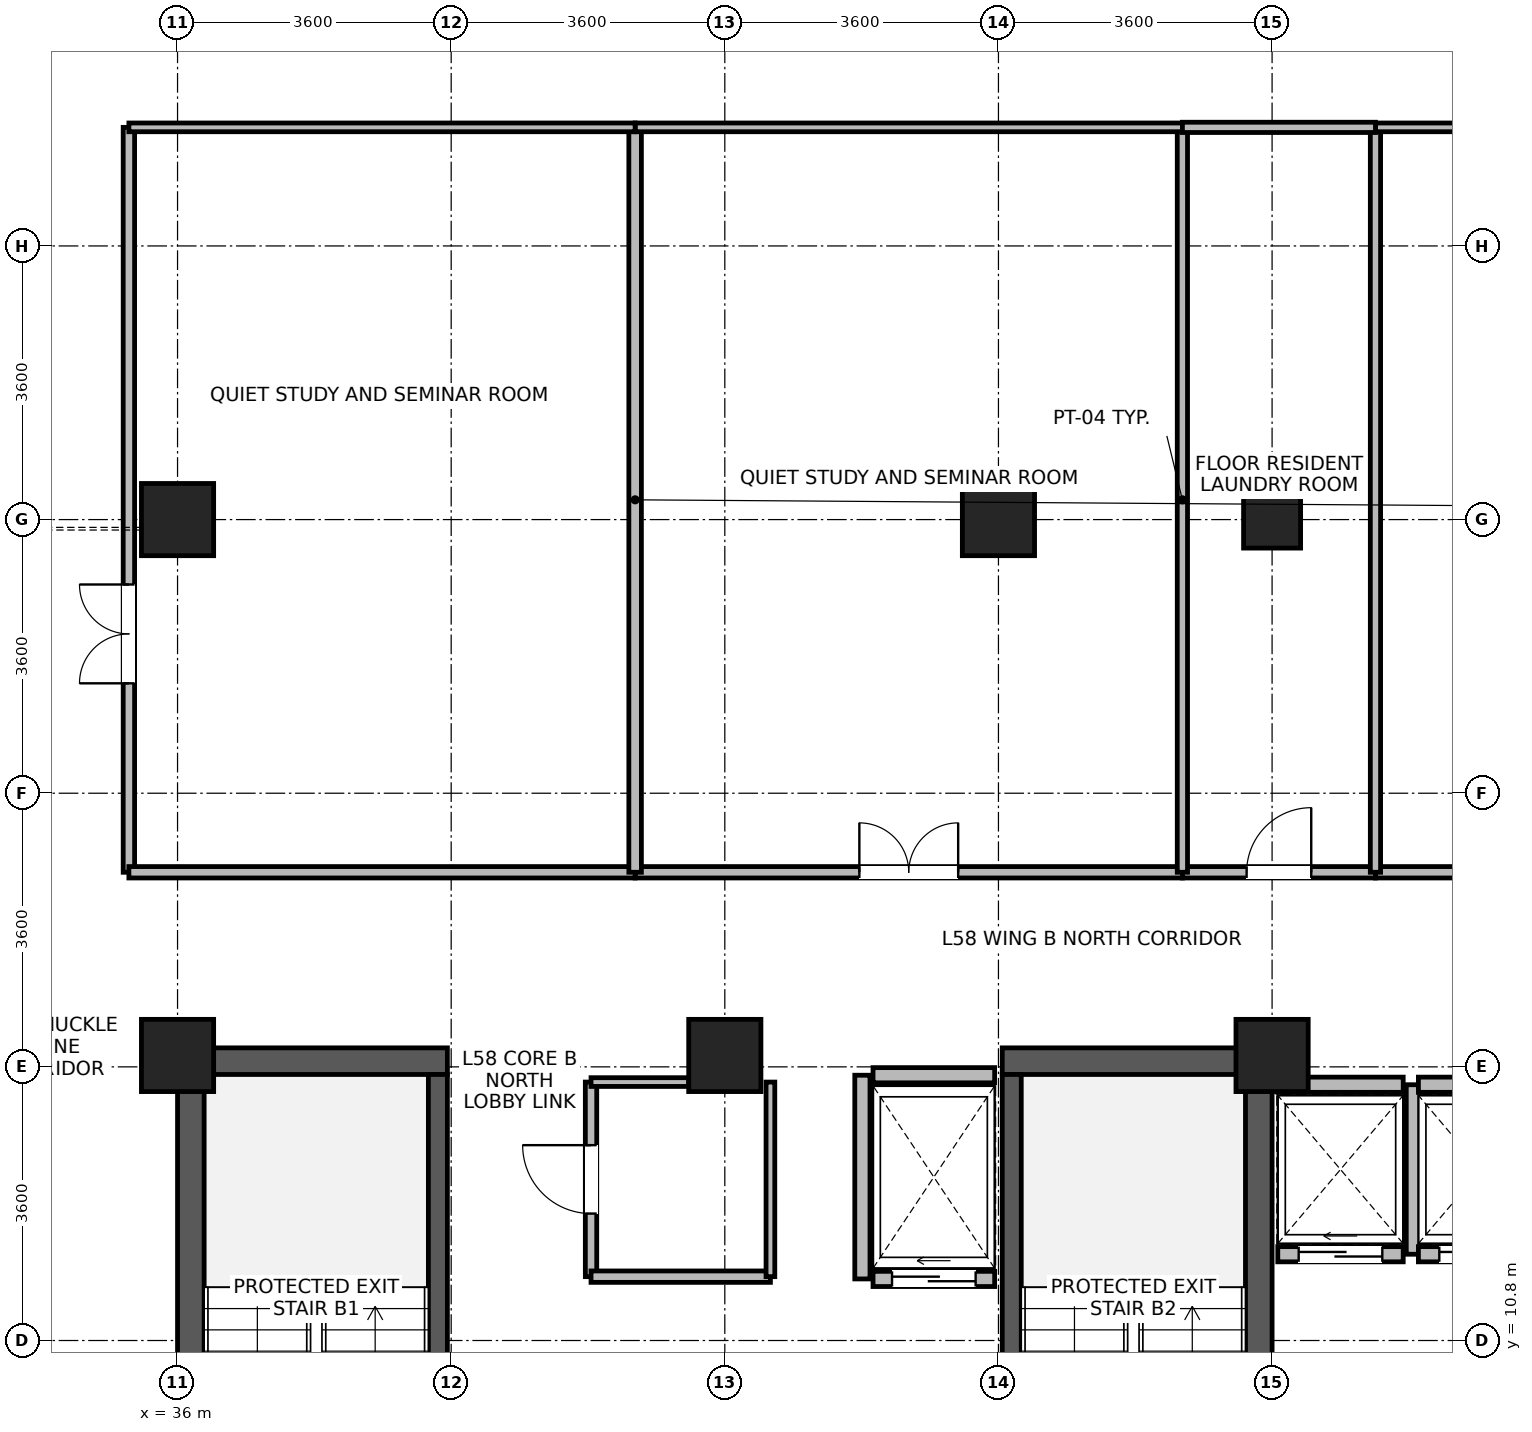
"""IFC4 building model, lengths in metres.
Left out: names, types, materials, properties, quantities, classifications, styles, units other than length and angle.
Written with IfcOpenShell. Run it as: python <this file> out.ifc"""

import sys

from ifc_helpers import new_model, si_unit, direction, frame, frame_2d, origin, origin_2d, place, context, subcontext, project, spatial, rectangle, extrude, source, transform, mapped, element, fill, save


model = new_model("IFC4")
c1 = context("Model", 3, precision=1e-05, world=origin(), true_north=direction((0.0, 1.0)))
c2 = subcontext(c1, "Body", "Model", "MODEL_VIEW")
j1 = project(units=[si_unit("LENGTHUNIT", "METRE"), si_unit("PLANEANGLEUNIT", "RADIAN")], contexts=[c1])
p1 = place(None, origin())
s1 = spatial("IfcSite", under=j1, at=p1, CompositionType="ELEMENT")
p2 = place(p1, origin())
s2 = spatial("IfcBuilding", under=s1, at=p2, CompositionType="ELEMENT")
p3 = place(p2, frame((0.0, 0.0, 227.7)))
s3 = spatial("IfcBuildingStorey", under=s2, at=p3, CompositionType="ELEMENT", Elevation=227.7)
for number, where, z_axis, x_axis in (
    (1, (36.175, 6.95, 0.0), (0.0, 0.0, 1.0), (0.0, 1.0, 0.0)),
    (2, (50.225, 6.95, 0.0), (0.0, 0.0, 1.0), (0.0, 1.0, 0.0)),
):
    element("IfcWall", number, at=place(p3, frame(where, z_axis=z_axis, x_axis=x_axis)), inside=s3, PredefinedType="SHEAR", context=c2, shape_type="SweptSolid", body=[
        extrude(rectangle(XDim=7.7, YDim=0.35, at=frame_2d((3.85, 0.0))), origin(), (0.0, 0.0, 1.0), 3.47),
    ])
for number, where, z_axis, x_axis in (
    (3, (36.35, 14.475, 0.0), (0.0, 0.0, 1.0), (1.0, 0.0, 0.0)),
    (4, (46.85, 14.475, 0.0), (0.0, 0.0, 1.0), (1.0, 0.0, 0.0)),
):
    element("IfcWall", number, at=place(p3, frame(where, z_axis=z_axis, x_axis=x_axis)), inside=s3, PredefinedType="SHEAR", context=c2, shape_type="SweptSolid", body=[
        extrude(rectangle(XDim=3.2, YDim=0.35, at=frame_2d((1.6, 0.0))), origin(), (0.0, 0.0, 1.0), 3.47),
    ])
p4 = place(p3, frame((39.425, 7.3, 0.0), z_axis=(0.0, 0.0, 1.0), x_axis=(0.0, 1.0, 0.0)))
e5 = element("IfcWall", 5, at=p4, inside=s3, PredefinedType="SHEAR", context=c2, shape_type="SweptSolid", body=[
    extrude(rectangle(XDim=7.0, YDim=0.25, at=frame_2d((3.5, 0.0))), origin(), (0.0, 0.0, 1.0), 3.47),
])
p5 = place(p4, frame((0.15, 0.0, 0.0)))
e6 = element("IfcOpeningElement", 6, at=p5, cuts=e5, PredefinedType="OPENING", context=c2, shape_type="SweptSolid", body=[
    extrude(rectangle(XDim=1.1, YDim=2.08, at=frame_2d((0.55, 1.04))), frame((0.0, 0.135, 0.0), z_axis=(0.0, -1.0, 0.0), x_axis=(1.0, 0.0, 0.0)), (0.0, 0.0, 1.0), 0.27),
])
p6 = place(p3, frame((46.975, 7.3, 0.0), z_axis=(0.0, 0.0, 1.0), x_axis=(0.0, 1.0, 0.0)))
e7 = element("IfcWall", 7, at=p6, inside=s3, PredefinedType="SHEAR", context=c2, shape_type="SweptSolid", body=[
    extrude(rectangle(XDim=7.0, YDim=0.25, at=frame_2d((3.5, 0.0))), origin(), (0.0, 0.0, 1.0), 3.47),
])
p7 = place(p6, frame((0.15, 0.0, 0.0)))
e8 = element("IfcOpeningElement", 8, at=p7, cuts=e7, PredefinedType="OPENING", context=c2, shape_type="SweptSolid", body=[
    extrude(rectangle(XDim=1.1, YDim=2.08, at=frame_2d((0.55, 1.04))), frame((0.0, 0.135, 0.0), z_axis=(0.0, -1.0, 0.0), x_axis=(1.0, 0.0, 0.0)), (0.0, 0.0, 1.0), 0.27),
])
m1 = source(origin(), c2, "Body", "SweptSolid", [
    extrude(rectangle(XDim=0.95, YDim=0.95, at=origin_2d()), origin(), (0.0, 0.0, 1.0), 3.7),
])
for number, where, z_axis, x_axis in (
    (9, (36.0, 21.6, 0.0), (0.0, 0.0, 1.0), (1.0, 0.0, 0.0)),
    (10, (46.8, 21.6, 0.0), (0.0, 0.0, 1.0), (1.0, 0.0, 0.0)),
    (11, (36.0, 14.55, 0.0), (0.0, 0.0, 1.0), (1.0, 0.0, 0.0)),
    (12, (43.2, 14.55, 0.0), (0.0, 0.0, 1.0), (1.0, 0.0, 0.0)),
    (13, (50.4, 14.55, 0.0), (0.0, 0.0, 1.0), (1.0, 0.0, 0.0)),
):
    element("IfcColumn", number, at=place(p3, frame(where, z_axis=z_axis, x_axis=x_axis)), inside=s3, PredefinedType="COLUMN", context=c2, shape_type="MappedRepresentation", body=[
        mapped(m1, transform((0.0, 0.0, 0.0), x_axis=(1.0, 0.0, 0.0), y_axis=(0.0, 1.0, 0.0), z_axis=(0.0, 0.0, 1.0), scale=1.0)),
    ])
m2 = source(origin(), c2, "Body", "SweptSolid", [
    extrude(rectangle(XDim=0.75, YDim=0.75, at=origin_2d()), origin(), (0.0, 0.0, 1.0), 3.7),
])
p8 = place(p3, frame((50.4, 21.6, 0.0), z_axis=(0.0, 0.0, 1.0), x_axis=(1.0, 0.0, 0.0)))
e14 = element("IfcColumn", 14, at=p8, inside=s3, PredefinedType="PILASTER", context=c2, shape_type="MappedRepresentation", body=[
    mapped(m2, transform((0.0, 0.0, 0.0), x_axis=(1.0, 0.0, 0.0), y_axis=(0.0, 1.0, 0.0), z_axis=(0.0, 0.0, 1.0), scale=1.0)),
])
p9 = place(p3, frame((50.475, 11.935, 0.0), z_axis=(0.0, 0.0, 1.0), x_axis=(1.0, 0.0, 0.0)))
e15 = element("IfcWall", 15, at=p9, inside=s3, PredefinedType="PARTITIONING", context=c2, shape_type="SweptSolid", body=[
    extrude(rectangle(XDim=1.65, YDim=0.2, at=frame_2d((0.825, 0.0))), origin(), (0.0, 0.0, 1.0), 3.45),
])
p10 = place(p9, frame((0.275, 0.0, 0.0)))
e16 = element("IfcOpeningElement", 16, at=p10, cuts=e15, PredefinedType="OPENING", context=c2, shape_type="SweptSolid", body=[
    extrude(rectangle(XDim=1.1, YDim=2.12, at=frame_2d((0.55, 1.06))), frame((0.0, 0.11, 0.0), z_axis=(0.0, -1.0, 0.0), x_axis=(1.0, 0.0, 0.0)), (0.0, 0.0, 1.0), 0.22),
])
p11 = place(p3, frame((50.475, 14.165, 0.0), z_axis=(0.0, 0.0, 1.0), x_axis=(1.0, 0.0, 0.0)))
e17 = element("IfcWall", 17, at=p11, inside=s3, PredefinedType="PARTITIONING", context=c2, shape_type="SweptSolid", body=[
    extrude(rectangle(XDim=1.65, YDim=0.2, at=frame_2d((0.825, 0.0))), origin(), (0.0, 0.0, 1.0), 3.45),
])
p12 = place(p3, frame((52.265, 11.935, 0.0), z_axis=(0.0, 0.0, 1.0), x_axis=(0.0, 1.0, 0.0)))
e18 = element("IfcWall", 18, at=p12, inside=s3, PredefinedType="PARTITIONING", context=c2, shape_type="SweptSolid", body=[
    extrude(rectangle(XDim=2.23, YDim=0.2, at=frame_2d((1.115, 0.0))), origin(), (0.0, 0.0, 1.0), 3.45),
])
p13 = place(p3, frame((52.325, 11.935, 0.0), z_axis=(0.0, 0.0, 1.0), x_axis=(1.0, 0.0, 0.0)))
e19 = element("IfcWall", 19, at=p13, inside=s3, PredefinedType="PARTITIONING", context=c2, shape_type="SweptSolid", body=[
    extrude(rectangle(XDim=1.65, YDim=0.2, at=frame_2d((0.825, 0.0))), origin(), (0.0, 0.0, 1.0), 3.45),
])
p14 = place(p13, frame((0.275, 0.0, 0.0)))
e20 = element("IfcOpeningElement", 20, at=p14, cuts=e19, PredefinedType="OPENING", context=c2, shape_type="SweptSolid", body=[
    extrude(rectangle(XDim=1.1, YDim=2.12, at=frame_2d((0.55, 1.06))), frame((0.0, 0.11, 0.0), z_axis=(0.0, -1.0, 0.0), x_axis=(1.0, 0.0, 0.0)), (0.0, 0.0, 1.0), 0.22),
])
p15 = place(p3, frame((52.325, 14.165, 0.0), z_axis=(0.0, 0.0, 1.0), x_axis=(1.0, 0.0, 0.0)))
e21 = element("IfcWall", 21, at=p15, inside=s3, PredefinedType="PARTITIONING", context=c2, shape_type="SweptSolid", body=[
    extrude(rectangle(XDim=1.65, YDim=0.2, at=frame_2d((0.825, 0.0))), origin(), (0.0, 0.0, 1.0), 3.45),
])
p16 = place(p3, frame((45.15, 11.61, 0.0), z_axis=(0.0, 0.0, 1.0), x_axis=(1.0, 0.0, 0.0)))
e22 = element("IfcWall", 22, at=p16, inside=s3, PredefinedType="PARTITIONING", context=c2, shape_type="SweptSolid", body=[
    extrude(rectangle(XDim=1.6, YDim=0.2, at=frame_2d((0.8, 0.0))), origin(), (0.0, 0.0, 1.0), 3.45),
])
p17 = place(p16, frame((0.25, 0.0, 0.0)))
e23 = element("IfcOpeningElement", 23, at=p17, cuts=e22, PredefinedType="OPENING", context=c2, shape_type="SweptSolid", body=[
    extrude(rectangle(XDim=1.1, YDim=2.12, at=frame_2d((0.55, 1.06))), frame((0.0, 0.11, 0.0), z_axis=(0.0, -1.0, 0.0), x_axis=(1.0, 0.0, 0.0)), (0.0, 0.0, 1.0), 0.22),
])
p18 = place(p3, frame((45.15, 14.29, 0.0), z_axis=(0.0, 0.0, 1.0), x_axis=(1.0, 0.0, 0.0)))
e24 = element("IfcWall", 24, at=p18, inside=s3, PredefinedType="PARTITIONING", context=c2, shape_type="SweptSolid", body=[
    extrude(rectangle(XDim=1.6, YDim=0.2, at=frame_2d((0.8, 0.0))), origin(), (0.0, 0.0, 1.0), 2.55),
])
p19 = place(p3, frame((45.01, 11.61, 0.0), z_axis=(0.0, 0.0, 1.0), x_axis=(0.0, 1.0, 0.0)))
e25 = element("IfcWall", 25, at=p19, inside=s3, PredefinedType="PARTITIONING", context=c2, shape_type="SweptSolid", body=[
    extrude(rectangle(XDim=2.68, YDim=0.2, at=frame_2d((1.34, 0.0))), origin(), (0.0, 0.0, 1.0), 3.45),
])
p20 = place(p3, frame((35.36, 16.96, 0.0), z_axis=(0.0, 0.0, 1.0), x_axis=(0.0, 1.0, 0.0)))
e26 = element("IfcWall", 26, at=p20, inside=s3, PredefinedType="PARTITIONING", context=c2, shape_type="SweptSolid", body=[
    extrude(rectangle(XDim=9.8, YDim=0.15, at=frame_2d((4.9, 0.0))), origin(), (0.0, 0.0, 1.0), 3.45),
])
p21 = place(p20, frame((2.486, 0.0, 0.0)))
e27 = element("IfcOpeningElement", 27, at=p21, cuts=e26, PredefinedType="OPENING", context=c2, shape_type="SweptSolid", body=[
    extrude(rectangle(XDim=1.3, YDim=2.12, at=frame_2d((0.65, 1.06))), frame((0.0, 0.085, 0.0), z_axis=(0.0, -1.0, 0.0), x_axis=(1.0, 0.0, 0.0)), (0.0, 0.0, 1.0), 0.17),
])
p22 = place(p3, frame((51.76, 16.96, 0.0), z_axis=(0.0, 0.0, 1.0), x_axis=(1.0, 0.0, 0.0)))
e28 = element("IfcWall", 28, at=p22, inside=s3, PredefinedType="PARTITIONING", context=c2, shape_type="SweptSolid", body=[
    extrude(rectangle(XDim=8.808, YDim=0.15, at=frame_2d((4.404, 0.0))), origin(), (0.0, 0.0, 1.0), 3.45),
])
p23 = place(p22, frame((3.754, 0.0, 0.0)))
e29 = element("IfcOpeningElement", 29, at=p23, cuts=e28, PredefinedType="OPENING", context=c2, shape_type="SweptSolid", body=[
    extrude(rectangle(XDim=1.3, YDim=2.12, at=frame_2d((0.65, 1.06))), frame((0.0, 0.085, 0.0), z_axis=(0.0, -1.0, 0.0), x_axis=(1.0, 0.0, 0.0)), (0.0, 0.0, 1.0), 0.17),
])
p24 = place(p3, frame((42.02, 16.96, 0.0), z_axis=(0.0, 0.0, 1.0), x_axis=(1.0, 0.0, 0.0)))
e30 = element("IfcWall", 30, at=p24, inside=s3, PredefinedType="PARTITIONING", context=c2, shape_type="SweptSolid", body=[
    extrude(rectangle(XDim=7.2, YDim=0.15, at=frame_2d((3.6, 0.0))), origin(), (0.0, 0.0, 1.0), 3.45),
])
p25 = place(p24, frame((2.95, 0.0, 0.0)))
e31 = element("IfcOpeningElement", 31, at=p25, cuts=e30, PredefinedType="OPENING", context=c2, shape_type="SweptSolid", body=[
    extrude(rectangle(XDim=1.3, YDim=2.12, at=frame_2d((0.65, 1.06))), frame((0.0, 0.085, 0.0), z_axis=(0.0, -1.0, 0.0), x_axis=(1.0, 0.0, 0.0)), (0.0, 0.0, 1.0), 0.17),
])
p26 = place(p3, frame((35.36, 16.96, 0.0), z_axis=(0.0, 0.0, 1.0), x_axis=(1.0, 0.0, 0.0)))
e32 = element("IfcWall", 32, at=p26, inside=s3, PredefinedType="PARTITIONING", context=c2, shape_type="SweptSolid", body=[
    extrude(rectangle(XDim=6.66, YDim=0.15, at=frame_2d((3.33, 0.0))), origin(), (0.0, 0.0, 1.0), 3.45),
])
p27 = place(p3, frame((41.44, 11.64, 0.0), z_axis=(0.0, 0.0, 1.0), x_axis=(0.0, 1.0, 0.0)))
e33 = element("IfcWall", 33, at=p27, inside=s3, PredefinedType="PARTITIONING", context=c2, shape_type="SweptSolid", body=[
    extrude(rectangle(XDim=2.56, YDim=0.15, at=frame_2d((1.28, 0.0))), origin(), (0.0, 0.0, 1.0), 3.45),
])
p28 = place(p27, frame((0.83, 0.0, 0.0)))
e34 = element("IfcOpeningElement", 34, at=p28, cuts=e33, PredefinedType="OPENING", context=c2, shape_type="SweptSolid", body=[
    extrude(rectangle(XDim=0.9, YDim=2.08, at=frame_2d((0.45, 1.04))), frame((0.0, 0.085, 0.0), z_axis=(0.0, -1.0, 0.0), x_axis=(1.0, 0.0, 0.0)), (0.0, 0.0, 1.0), 0.17),
])
p29 = place(p3, frame((49.22, 16.96, 0.0), z_axis=(0.0, 0.0, 1.0), x_axis=(1.0, 0.0, 0.0)))
e35 = element("IfcWall", 35, at=p29, inside=s3, PredefinedType="PARTITIONING", context=c2, shape_type="SweptSolid", body=[
    extrude(rectangle(XDim=2.54, YDim=0.15, at=frame_2d((1.27, 0.0))), origin(), (0.0, 0.0, 1.0), 3.45),
])
p30 = place(p29, frame((0.845, 0.0, 0.0)))
e36 = element("IfcOpeningElement", 36, at=p30, cuts=e35, PredefinedType="OPENING", context=c2, shape_type="SweptSolid", body=[
    extrude(rectangle(XDim=0.85, YDim=2.04, at=frame_2d((0.425, 1.02))), frame((0.0, 0.085, 0.0), z_axis=(0.0, -1.0, 0.0), x_axis=(1.0, 0.0, 0.0)), (0.0, 0.0, 1.0), 0.17),
])
p31 = place(p3, frame((41.44, 11.64, 0.0), z_axis=(0.0, 0.0, 1.0), x_axis=(1.0, 0.0, 0.0)))
e37 = element("IfcWall", 37, at=p31, inside=s3, PredefinedType="PARTITIONING", context=c2, shape_type="SweptSolid", body=[
    extrude(rectangle(XDim=2.36, YDim=0.15, at=frame_2d((1.18, 0.0))), origin(), (0.0, 0.0, 1.0), 3.45),
])
p32 = place(p3, frame((42.02, 16.96, 0.0), z_axis=(0.0, 0.0, 1.0), x_axis=(0.0, 1.0, 0.0)))
e38 = element("IfcWall", 38, at=p32, inside=s3, PredefinedType="PARTITIONING", context=c2, shape_type="SweptSolid", body=[
    extrude(rectangle(XDim=9.8, YDim=0.165, at=frame_2d((4.9, 0.0))), origin(), (0.0, 0.0, 1.0), 3.45),
])
for number, where, z_axis, x_axis in (
    (39, (49.22, 16.96, 0.0), (0.0, 0.0, 1.0), (0.0, 1.0, 0.0)),
    (40, (51.76, 16.96, 0.0), (0.0, 0.0, 1.0), (0.0, 1.0, 0.0)),
):
    element("IfcWall", number, at=place(p3, frame(where, z_axis=z_axis, x_axis=x_axis)), inside=s3, PredefinedType="PARTITIONING", context=c2, shape_type="SweptSolid", body=[
        extrude(rectangle(XDim=9.8, YDim=0.135, at=frame_2d((4.9, 0.0))), origin(), (0.0, 0.0, 1.0), 3.45),
    ])
p33 = place(p3, frame((51.76, 26.76, 0.0), z_axis=(0.0, 0.0, 1.0), x_axis=(1.0, 0.0, 0.0)))
e41 = element("IfcWall", 41, at=p33, inside=s3, PredefinedType="PARTITIONING", context=c2, shape_type="SweptSolid", body=[
    extrude(rectangle(XDim=8.808, YDim=0.115, at=frame_2d((4.404, 0.0))), origin(), (0.0, 0.0, 1.0), 3.45),
])
p34 = place(p3, frame((42.02, 26.76, 0.0), z_axis=(0.0, 0.0, 1.0), x_axis=(1.0, 0.0, 0.0)))
e42 = element("IfcWall", 42, at=p34, inside=s3, PredefinedType="PARTITIONING", context=c2, shape_type="SweptSolid", body=[
    extrude(rectangle(XDim=7.2, YDim=0.115, at=frame_2d((3.6, 0.0))), origin(), (0.0, 0.0, 1.0), 3.45),
])
p35 = place(p3, frame((35.36, 26.76, 0.0), z_axis=(0.0, 0.0, 1.0), x_axis=(1.0, 0.0, 0.0)))
e43 = element("IfcWall", 43, at=p35, inside=s3, PredefinedType="PARTITIONING", context=c2, shape_type="SweptSolid", body=[
    extrude(rectangle(XDim=6.66, YDim=0.115, at=frame_2d((3.33, 0.0))), origin(), (0.0, 0.0, 1.0), 3.45),
])
p36 = place(p3, frame((43.8, 11.64, 0.0), z_axis=(0.0, 0.0, 1.0), x_axis=(0.0, 1.0, 0.0)))
e44 = element("IfcWall", 44, at=p36, inside=s3, PredefinedType="PARTITIONING", context=c2, shape_type="SweptSolid", body=[
    extrude(rectangle(XDim=2.56, YDim=0.115, at=frame_2d((1.28, 0.0))), origin(), (0.0, 0.0, 1.0), 3.45),
])
p37 = place(p3, frame((49.22, 26.76, 0.0), z_axis=(0.0, 0.0, 1.0), x_axis=(1.0, 0.0, 0.0)))
e45 = element("IfcWall", 45, at=p37, inside=s3, PredefinedType="PARTITIONING", context=c2, shape_type="SweptSolid", body=[
    extrude(rectangle(XDim=2.54, YDim=0.135, at=frame_2d((1.27, 0.0))), origin(), (0.0, 0.0, 1.0), 3.45),
])
p38 = place(p3, frame((41.44, 14.2, 0.0), z_axis=(0.0, 0.0, 1.0), x_axis=(1.0, 0.0, 0.0)))
e46 = element("IfcWall", 46, at=p38, inside=s3, PredefinedType="PARTITIONING", context=c2, shape_type="SweptSolid", body=[
    extrude(rectangle(XDim=1.285, YDim=0.115, at=frame_2d((0.643, 0.0))), origin(), (0.0, 0.0, 1.0), 2.55),
])
p39 = place(p10, origin())
e47 = element("IfcDoor", 47, at=p39, inside=s3, OperationType="SLIDING_TO_LEFT", PredefinedType="DOOR", context=c2, shape_type="SweptSolid", body=[
    extrude(rectangle(XDim=1.1, YDim=2.12, at=frame_2d((0.55, 1.06))), frame((0.0, 0.025, 0.0), z_axis=(0.0, -1.0, 0.0), x_axis=(1.0, 0.0, 0.0)), (0.0, 0.0, 1.0), 0.05),
])
fill(e16, e47)
p40 = place(p14, origin())
e48 = element("IfcDoor", 48, at=p40, inside=s3, OperationType="SLIDING_TO_LEFT", PredefinedType="DOOR", context=c2, shape_type="SweptSolid", body=[
    extrude(rectangle(XDim=1.1, YDim=2.12, at=frame_2d((0.55, 1.06))), frame((0.0, 0.025, 0.0), z_axis=(0.0, -1.0, 0.0), x_axis=(1.0, 0.0, 0.0)), (0.0, 0.0, 1.0), 0.05),
])
fill(e20, e48)
p41 = place(p17, origin())
e49 = element("IfcDoor", 49, at=p41, inside=s3, OperationType="SLIDING_TO_LEFT", PredefinedType="DOOR", context=c2, shape_type="SweptSolid", body=[
    extrude(rectangle(XDim=1.1, YDim=2.12, at=frame_2d((0.55, 1.06))), frame((0.0, 0.025, 0.0), z_axis=(0.0, -1.0, 0.0), x_axis=(1.0, 0.0, 0.0)), (0.0, 0.0, 1.0), 0.05),
])
fill(e23, e49)
p42 = place(p21, origin())
e50 = element("IfcDoor", 50, at=p42, inside=s3, OperationType="DOUBLE_DOOR_SINGLE_SWING", PredefinedType="DOOR", context=c2, shape_type="SweptSolid", body=[
    extrude(rectangle(XDim=1.3, YDim=2.12, at=frame_2d((0.65, 1.06))), frame((0.0, 0.025, 0.0), z_axis=(0.0, -1.0, 0.0), x_axis=(1.0, 0.0, 0.0)), (0.0, 0.0, 1.0), 0.05),
])
fill(e27, e50)
p43 = place(p25, origin())
e51 = element("IfcDoor", 51, at=p43, inside=s3, OperationType="DOUBLE_DOOR_SINGLE_SWING", PredefinedType="DOOR", context=c2, shape_type="SweptSolid", body=[
    extrude(rectangle(XDim=1.3, YDim=2.12, at=frame_2d((0.65, 1.06))), frame((0.0, 0.025, 0.0), z_axis=(0.0, -1.0, 0.0), x_axis=(1.0, 0.0, 0.0)), (0.0, 0.0, 1.0), 0.05),
])
fill(e31, e51)
p44 = place(p28, origin())
e52 = element("IfcDoor", 52, at=p44, inside=s3, OperationType="SINGLE_SWING_RIGHT", PredefinedType="DOOR", context=c2, shape_type="SweptSolid", body=[
    extrude(rectangle(XDim=0.9, YDim=2.08, at=frame_2d((0.45, 1.04))), frame((0.0, 0.025, 0.0), z_axis=(0.0, -1.0, 0.0), x_axis=(1.0, 0.0, 0.0)), (0.0, 0.0, 1.0), 0.05),
])
fill(e34, e52)
p45 = place(p30, origin())
e53 = element("IfcDoor", 53, at=p45, inside=s3, OperationType="SINGLE_SWING_RIGHT", PredefinedType="DOOR", context=c2, shape_type="SweptSolid", body=[
    extrude(rectangle(XDim=0.85, YDim=2.04, at=frame_2d((0.425, 1.02))), frame((0.0, 0.025, 0.0), z_axis=(0.0, -1.0, 0.0), x_axis=(1.0, 0.0, 0.0)), (0.0, 0.0, 1.0), 0.05),
])
fill(e36, e53)
save(model, sys.argv[1])
